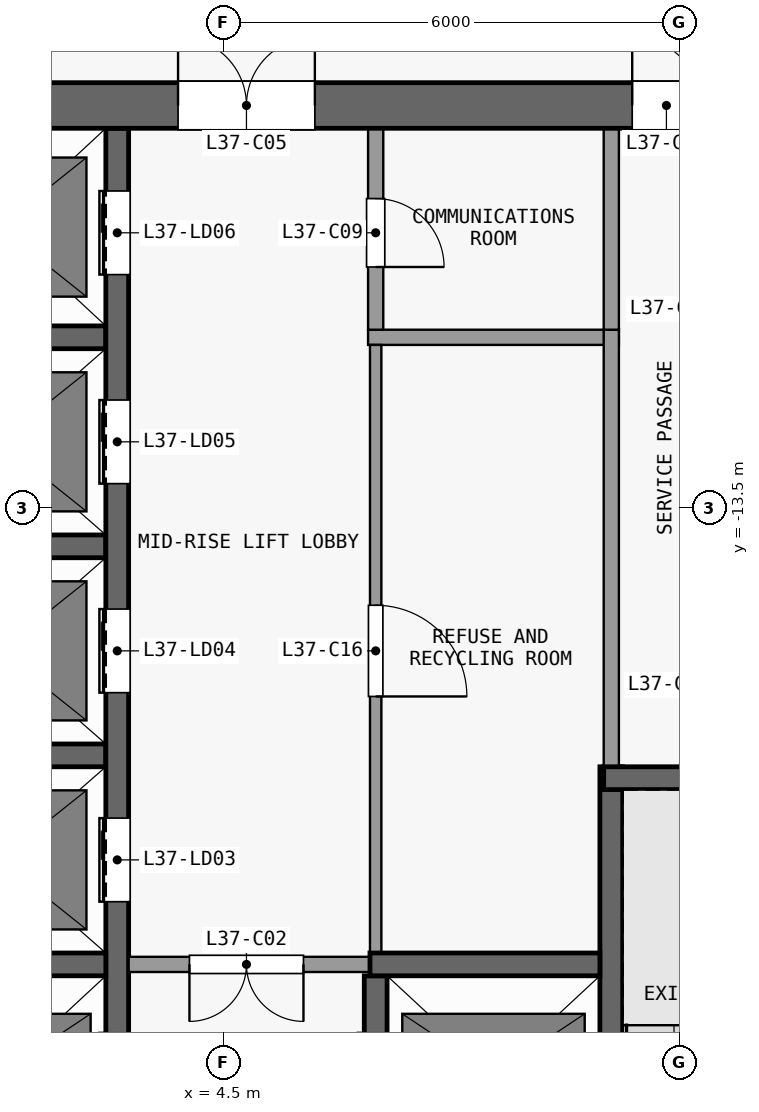
"""IFC4 building model, lengths in metres.
Left out: names, types, materials, properties, quantities, classifications, styles, units other than length and angle.
Written with IfcOpenShell. Run it as: python <this file> out.ifc"""

import sys

from ifc_helpers import new_model, si_unit, direction, frame, frame_2d, origin, place, context, subcontext, project, spatial, rectangle, extrude, element, fill, save


model = new_model("IFC4")
c1 = context("Model", 3, precision=1e-05, world=origin(), true_north=direction((0.0, 1.0)))
c2 = subcontext(c1, "Body", "Model", "MODEL_VIEW")
j1 = project(units=[si_unit("LENGTHUNIT", "METRE"), si_unit("PLANEANGLEUNIT", "RADIAN")], contexts=[c1])
p1 = place(None, origin())
s1 = spatial("IfcSite", under=j1, at=p1, CompositionType="ELEMENT")
p2 = place(p1, origin())
s2 = spatial("IfcBuilding", under=s1, at=p2, CompositionType="ELEMENT")
p3 = place(p2, frame((0.0, 0.0, 152.9)))
s3 = spatial("IfcBuildingStorey", under=s2, at=p3, CompositionType="ELEMENT", Elevation=152.9)
p4 = place(p3, frame((-13.3, -8.2, 0.0), z_axis=(0.0, 0.0, 1.0), x_axis=(1.0, 0.0, 0.0)))
e1 = element("IfcWall", 1, at=p4, inside=s3, PredefinedType="SHEAR", context=c2, shape_type="SweptSolid", body=[
    extrude(rectangle(XDim=26.6, YDim=0.6, at=frame_2d((13.3, 0.0))), origin(), (0.0, 0.0, 1.0), 3.3),
])
p5 = place(p4, frame((7.6, 0.0, 0.0)))
e2 = element("IfcOpeningElement", 2, at=p5, cuts=e1, PredefinedType="OPENING", context=c2, shape_type="SweptSolid", body=[
    extrude(rectangle(XDim=1.8, YDim=2.1, at=frame_2d((0.9, 1.05))), frame((0.0, 0.31, 0.0), z_axis=(0.0, -1.0, 0.0), x_axis=(1.0, 0.0, 0.0)), (0.0, 0.0, 1.0), 0.62),
])
p6 = place(p4, frame((17.2, 0.0, 0.0)))
e3 = element("IfcOpeningElement", 3, at=p6, cuts=e1, PredefinedType="OPENING", context=c2, shape_type="SweptSolid", body=[
    extrude(rectangle(XDim=1.8, YDim=2.1, at=frame_2d((0.9, 1.05))), frame((0.0, 0.31, 0.0), z_axis=(0.0, -1.0, 0.0), x_axis=(1.0, 0.0, 0.0)), (0.0, 0.0, 1.0), 0.62),
])
p7 = place(p4, frame((1.525, 0.0, 0.0)))
e4 = element("IfcOpeningElement", 4, at=p7, cuts=e1, PredefinedType="OPENING", context=c2, shape_type="SweptSolid", body=[
    extrude(rectangle(XDim=1.2, YDim=2.1, at=frame_2d((0.6, 1.05))), frame((0.0, 0.31, 0.0), z_axis=(0.0, -1.0, 0.0), x_axis=(1.0, 0.0, 0.0)), (0.0, 0.0, 1.0), 0.62),
])
p8 = place(p4, frame((23.175, 0.0, 0.0)))
e5 = element("IfcOpeningElement", 5, at=p8, cuts=e1, PredefinedType="OPENING", context=c2, shape_type="SweptSolid", body=[
    extrude(rectangle(XDim=0.9, YDim=2.1, at=frame_2d((0.45, 1.05))), frame((0.0, 0.31, 0.0), z_axis=(0.0, -1.0, 0.0), x_axis=(1.0, 0.0, 0.0)), (0.0, 0.0, 1.0), 0.62),
])
p9 = place(p3, frame((0.15, -19.5, 0.0), z_axis=(0.0, 0.0, 1.0), x_axis=(1.0, 0.0, 0.0)))
e6 = element("IfcWall", 6, at=p9, inside=s3, PredefinedType="SHEAR", context=c2, shape_type="SweptSolid", body=[
    extrude(rectangle(XDim=2.8, YDim=0.3, at=frame_2d((1.4, 0.0))), origin(), (0.0, 0.0, 1.0), 3.3),
])
p10 = place(p3, frame((6.575, -19.5, 0.0), z_axis=(0.0, 0.0, 1.0), x_axis=(-1.0, 0.0, 0.0)))
e7 = element("IfcWall", 7, at=p10, inside=s3, PredefinedType="PARTITIONING", context=c2, shape_type="SweptSolid", body=[
    extrude(rectangle(XDim=3.325, YDim=0.2, at=frame_2d((1.663, 0.0))), origin(), (0.0, 0.0, 1.0), 3.3),
])
p11 = place(p10, frame((1.025, 0.0, 0.0)))
e8 = element("IfcOpeningElement", 8, at=p11, cuts=e7, PredefinedType="OPENING", context=c2, shape_type="SweptSolid", body=[
    extrude(rectangle(XDim=1.5, YDim=2.1, at=frame_2d((0.75, 1.05))), frame((0.0, 0.11, 0.0), z_axis=(0.0, -1.0, 0.0), x_axis=(1.0, 0.0, 0.0)), (0.0, 0.0, 1.0), 0.22),
])
p12 = place(p3, frame((6.425, -19.5, 0.0), z_axis=(0.0, 0.0, 1.0), x_axis=(1.0, 0.0, 0.0)))
e9 = element("IfcWall", 9, at=p12, inside=s3, PredefinedType="SHEAR", context=c2, shape_type="SweptSolid", body=[
    extrude(rectangle(XDim=3.025, YDim=0.3, at=frame_2d((1.512, 0.0))), origin(), (0.0, 0.0, 1.0), 3.3),
])
p13 = place(p3, frame((9.5, -17.05, 0.0), z_axis=(0.0, 0.0, 1.0), x_axis=(1.0, 0.0, 0.0)))
e10 = element("IfcWall", 10, at=p13, inside=s3, PredefinedType="SHEAR", context=c2, shape_type="SweptSolid", body=[
    extrude(rectangle(XDim=3.1, YDim=0.3, at=frame_2d((1.55, 0.0))), origin(), (0.0, 0.0, 1.0), 3.3),
])
for number, where, z_axis, x_axis in (
    (11, (0.15, -16.75, 0.0), (0.0, 0.0, 1.0), (1.0, 0.0, 0.0)),
    (12, (0.15, -14.0, 0.0), (0.0, 0.0, 1.0), (1.0, 0.0, 0.0)),
    (13, (0.15, -11.25, 0.0), (0.0, 0.0, 1.0), (1.0, 0.0, 0.0)),
):
    element("IfcWall", number, at=place(p3, frame(where, z_axis=z_axis, x_axis=x_axis)), inside=s3, PredefinedType="SHEAR", context=c2, shape_type="SweptSolid", body=[
        extrude(rectangle(XDim=2.8, YDim=0.3, at=frame_2d((1.4, 0.0))), origin(), (0.0, 0.0, 1.0), 3.3),
    ])
p14 = place(p3, frame((6.4, -11.25, 0.0), z_axis=(0.0, 0.0, 1.0), x_axis=(1.0, 0.0, 0.0)))
e14 = element("IfcWall", 14, at=p14, inside=s3, PredefinedType="PARTITIONING", context=c2, shape_type="SweptSolid", body=[
    extrude(rectangle(XDim=3.3, YDim=0.2, at=frame_2d((1.65, 0.0))), origin(), (0.0, 0.0, 1.0), 3.3),
])
p15 = place(p3, frame((3.1, -22.55, 0.0), z_axis=(0.0, 0.0, 1.0), x_axis=(0.0, 1.0, 0.0)))
e15 = element("IfcWall", 15, at=p15, inside=s3, PredefinedType="SHEAR", context=c2, shape_type="SweptSolid", body=[
    extrude(rectangle(XDim=14.05, YDim=0.3, at=frame_2d((7.025, 0.0))), origin(), (0.0, 0.0, 1.0), 3.3),
])
p16 = place(p15, frame((1.05, 0.0, 0.0)))
e16 = element("IfcOpeningElement", 16, at=p16, cuts=e15, PredefinedType="OPENING", context=c2, shape_type="SweptSolid", body=[
    extrude(rectangle(XDim=1.1, YDim=2.1, at=frame_2d((0.55, 1.05))), frame((0.0, 0.16, 0.0), z_axis=(0.0, -1.0, 0.0), x_axis=(1.0, 0.0, 0.0)), (0.0, 0.0, 1.0), 0.32),
])
p17 = place(p15, frame((3.875, 0.0, 0.0)))
e17 = element("IfcOpeningElement", 17, at=p17, cuts=e15, PredefinedType="OPENING", context=c2, shape_type="SweptSolid", body=[
    extrude(rectangle(XDim=1.1, YDim=2.1, at=frame_2d((0.55, 1.05))), frame((0.0, 0.16, 0.0), z_axis=(0.0, -1.0, 0.0), x_axis=(1.0, 0.0, 0.0)), (0.0, 0.0, 1.0), 0.32),
])
p18 = place(p15, frame((6.625, 0.0, 0.0)))
e18 = element("IfcOpeningElement", 18, at=p18, cuts=e15, PredefinedType="OPENING", context=c2, shape_type="SweptSolid", body=[
    extrude(rectangle(XDim=1.1, YDim=2.1, at=frame_2d((0.55, 1.05))), frame((0.0, 0.16, 0.0), z_axis=(0.0, -1.0, 0.0), x_axis=(1.0, 0.0, 0.0)), (0.0, 0.0, 1.0), 0.32),
])
p19 = place(p15, frame((9.375, 0.0, 0.0)))
e19 = element("IfcOpeningElement", 19, at=p19, cuts=e15, PredefinedType="OPENING", context=c2, shape_type="SweptSolid", body=[
    extrude(rectangle(XDim=1.1, YDim=2.1, at=frame_2d((0.55, 1.05))), frame((0.0, 0.16, 0.0), z_axis=(0.0, -1.0, 0.0), x_axis=(1.0, 0.0, 0.0)), (0.0, 0.0, 1.0), 0.32),
])
p20 = place(p15, frame((12.125, 0.0, 0.0)))
e20 = element("IfcOpeningElement", 20, at=p20, cuts=e15, PredefinedType="OPENING", context=c2, shape_type="SweptSolid", body=[
    extrude(rectangle(XDim=1.1, YDim=2.1, at=frame_2d((0.55, 1.05))), frame((0.0, 0.16, 0.0), z_axis=(0.0, -1.0, 0.0), x_axis=(1.0, 0.0, 0.0)), (0.0, 0.0, 1.0), 0.32),
])
p21 = place(p3, frame((6.5, -22.25, 0.0), z_axis=(0.0, 0.0, 1.0), x_axis=(0.0, 1.0, 0.0)))
e21 = element("IfcWall", 21, at=p21, inside=s3, PredefinedType="SHEAR", context=c2, shape_type="SweptSolid", body=[
    extrude(rectangle(XDim=2.6, YDim=0.3, at=frame_2d((1.3, 0.0))), origin(), (0.0, 0.0, 1.0), 3.3),
])
p22 = place(p21, frame((0.75, 0.0, 0.0)))
e22 = element("IfcOpeningElement", 22, at=p22, cuts=e21, PredefinedType="OPENING", context=c2, shape_type="SweptSolid", body=[
    extrude(rectangle(XDim=1.1, YDim=2.1, at=frame_2d((0.55, 1.05))), frame((0.0, 0.16, 0.0), z_axis=(0.0, -1.0, 0.0), x_axis=(1.0, 0.0, 0.0)), (0.0, 0.0, 1.0), 0.32),
])
p23 = place(p3, frame((6.5, -11.35, 0.0), z_axis=(0.0, 0.0, 1.0), x_axis=(0.0, -1.0, 0.0)))
e23 = element("IfcWall", 23, at=p23, inside=s3, PredefinedType="PARTITIONING", context=c2, shape_type="SweptSolid", body=[
    extrude(rectangle(XDim=8.0, YDim=0.15, at=frame_2d((4.0, 0.0))), origin(), (0.0, 0.0, 1.0), 3.3),
])
p24 = place(p23, frame((3.425, 0.0, 0.0)))
e24 = element("IfcOpeningElement", 24, at=p24, cuts=e23, PredefinedType="OPENING", context=c2, shape_type="SweptSolid", body=[
    extrude(rectangle(XDim=1.2, YDim=2.1, at=frame_2d((0.6, 1.05))), frame((0.0, 0.085, 0.0), z_axis=(0.0, -1.0, 0.0), x_axis=(1.0, 0.0, 0.0)), (0.0, 0.0, 1.0), 0.17),
])
p25 = place(p3, frame((6.5, -8.5, 0.0), z_axis=(0.0, 0.0, 1.0), x_axis=(0.0, -1.0, 0.0)))
e25 = element("IfcWall", 25, at=p25, inside=s3, PredefinedType="PARTITIONING", context=c2, shape_type="SweptSolid", body=[
    extrude(rectangle(XDim=2.65, YDim=0.2, at=frame_2d((1.325, 0.0))), origin(), (0.0, 0.0, 1.0), 3.3),
])
p26 = place(p25, frame((0.925, 0.0, 0.0)))
e26 = element("IfcOpeningElement", 26, at=p26, cuts=e25, PredefinedType="OPENING", context=c2, shape_type="SweptSolid", body=[
    extrude(rectangle(XDim=0.9, YDim=2.1, at=frame_2d((0.45, 1.05))), frame((0.0, 0.11, 0.0), z_axis=(0.0, -1.0, 0.0), x_axis=(1.0, 0.0, 0.0)), (0.0, 0.0, 1.0), 0.22),
])
p27 = place(p3, frame((9.6, -16.9, 0.0), z_axis=(0.0, 0.0, 1.0), x_axis=(0.0, -1.0, 0.0)))
e27 = element("IfcWall", 27, at=p27, inside=s3, PredefinedType="SHEAR", context=c2, shape_type="SweptSolid", body=[
    extrude(rectangle(XDim=7.7, YDim=0.3, at=frame_2d((3.85, 0.0))), origin(), (0.0, 0.0, 1.0), 3.3),
])
p28 = place(p27, frame((6.5, 0.0, 0.0)))
e28 = element("IfcOpeningElement", 28, at=p28, cuts=e27, PredefinedType="OPENING", context=c2, shape_type="SweptSolid", body=[
    extrude(rectangle(XDim=1.1, YDim=2.1, at=frame_2d((0.55, 1.05))), frame((0.0, 0.16, 0.0), z_axis=(0.0, -1.0, 0.0), x_axis=(1.0, 0.0, 0.0)), (0.0, 0.0, 1.0), 0.32),
])
p29 = place(p3, frame((9.6, -16.9, 0.0), z_axis=(0.0, 0.0, 1.0), x_axis=(0.0, 1.0, 0.0)))
e29 = element("IfcWall", 29, at=p29, inside=s3, PredefinedType="PARTITIONING", context=c2, shape_type="SweptSolid", body=[
    extrude(rectangle(XDim=5.75, YDim=0.2, at=frame_2d((2.875, 0.0))), origin(), (0.0, 0.0, 1.0), 3.3),
])
p30 = place(p3, frame((9.6, -11.15, 0.0), z_axis=(0.0, 0.0, 1.0), x_axis=(0.0, 1.0, 0.0)))
e30 = element("IfcWall", 30, at=p30, inside=s3, PredefinedType="PARTITIONING", context=c2, shape_type="SweptSolid", body=[
    extrude(rectangle(XDim=2.65, YDim=0.2, at=frame_2d((1.325, 0.0))), origin(), (0.0, 0.0, 1.0), 3.3),
])
p31 = place(p17, origin())
e31 = element("IfcDoor", 31, at=p31, inside=s3, OperationType="DOUBLE_DOOR_SLIDING", PredefinedType="DOOR", context=c2, shape_type="SweptSolid", body=[
    extrude(rectangle(XDim=1.1, YDim=2.1, at=frame_2d((0.55, 1.05))), frame((0.0, 0.025, 0.0), z_axis=(0.0, -1.0, 0.0), x_axis=(1.0, 0.0, 0.0)), (0.0, 0.0, 1.0), 0.05),
])
fill(e17, e31)
p32 = place(p18, origin())
e32 = element("IfcDoor", 32, at=p32, inside=s3, OperationType="DOUBLE_DOOR_SLIDING", PredefinedType="DOOR", context=c2, shape_type="SweptSolid", body=[
    extrude(rectangle(XDim=1.1, YDim=2.1, at=frame_2d((0.55, 1.05))), frame((0.0, 0.025, 0.0), z_axis=(0.0, -1.0, 0.0), x_axis=(1.0, 0.0, 0.0)), (0.0, 0.0, 1.0), 0.05),
])
fill(e18, e32)
p33 = place(p19, origin())
e33 = element("IfcDoor", 33, at=p33, inside=s3, OperationType="DOUBLE_DOOR_SLIDING", PredefinedType="DOOR", context=c2, shape_type="SweptSolid", body=[
    extrude(rectangle(XDim=1.1, YDim=2.1, at=frame_2d((0.55, 1.05))), frame((0.0, 0.025, 0.0), z_axis=(0.0, -1.0, 0.0), x_axis=(1.0, 0.0, 0.0)), (0.0, 0.0, 1.0), 0.05),
])
fill(e19, e33)
p34 = place(p20, origin())
e34 = element("IfcDoor", 34, at=p34, inside=s3, OperationType="DOUBLE_DOOR_SLIDING", PredefinedType="DOOR", context=c2, shape_type="SweptSolid", body=[
    extrude(rectangle(XDim=1.1, YDim=2.1, at=frame_2d((0.55, 1.05))), frame((0.0, 0.025, 0.0), z_axis=(0.0, -1.0, 0.0), x_axis=(1.0, 0.0, 0.0)), (0.0, 0.0, 1.0), 0.05),
])
fill(e20, e34)
p35 = place(p11, origin())
e35 = element("IfcDoor", 35, at=p35, inside=s3, OperationType="DOUBLE_DOOR_SINGLE_SWING", PredefinedType="DOOR", context=c2, shape_type="SweptSolid", body=[
    extrude(rectangle(XDim=1.5, YDim=2.1, at=frame_2d((0.75, 1.05))), frame((0.0, 0.025, 0.0), z_axis=(0.0, -1.0, 0.0), x_axis=(1.0, 0.0, 0.0)), (0.0, 0.0, 1.0), 0.05),
])
fill(e8, e35)
p36 = place(p6, origin())
e36 = element("IfcDoor", 36, at=p36, inside=s3, OperationType="DOUBLE_DOOR_SINGLE_SWING", PredefinedType="DOOR", context=c2, shape_type="SweptSolid", body=[
    extrude(rectangle(XDim=1.8, YDim=2.1, at=frame_2d((0.9, 1.05))), frame((0.0, 0.025, 0.0), z_axis=(0.0, -1.0, 0.0), x_axis=(1.0, 0.0, 0.0)), (0.0, 0.0, 1.0), 0.05),
])
fill(e3, e36)
p37 = place(p26, origin())
e37 = element("IfcDoor", 37, at=p37, inside=s3, OperationType="SINGLE_SWING_RIGHT", PredefinedType="DOOR", context=c2, shape_type="SweptSolid", body=[
    extrude(rectangle(XDim=0.9, YDim=2.1, at=frame_2d((0.45, 1.05))), frame((0.0, 0.025, 0.0), z_axis=(0.0, -1.0, 0.0), x_axis=(1.0, 0.0, 0.0)), (0.0, 0.0, 1.0), 0.05),
])
fill(e26, e37)
p38 = place(p8, origin())
e38 = element("IfcDoor", 38, at=p38, inside=s3, OperationType="SINGLE_SWING_LEFT", PredefinedType="DOOR", context=c2, shape_type="SweptSolid", body=[
    extrude(rectangle(XDim=0.9, YDim=2.1, at=frame_2d((0.45, 1.05))), frame((0.0, 0.025, 0.0), z_axis=(0.0, -1.0, 0.0), x_axis=(1.0, 0.0, 0.0)), (0.0, 0.0, 1.0), 0.05),
])
fill(e5, e38)
p39 = place(p24, origin())
e39 = element("IfcDoor", 39, at=p39, inside=s3, OperationType="SINGLE_SWING_RIGHT", PredefinedType="DOOR", context=c2, shape_type="SweptSolid", body=[
    extrude(rectangle(XDim=1.2, YDim=2.1, at=frame_2d((0.6, 1.05))), frame((0.0, 0.025, 0.0), z_axis=(0.0, -1.0, 0.0), x_axis=(1.0, 0.0, 0.0)), (0.0, 0.0, 1.0), 0.05),
])
fill(e24, e39)
save(model, sys.argv[1])
